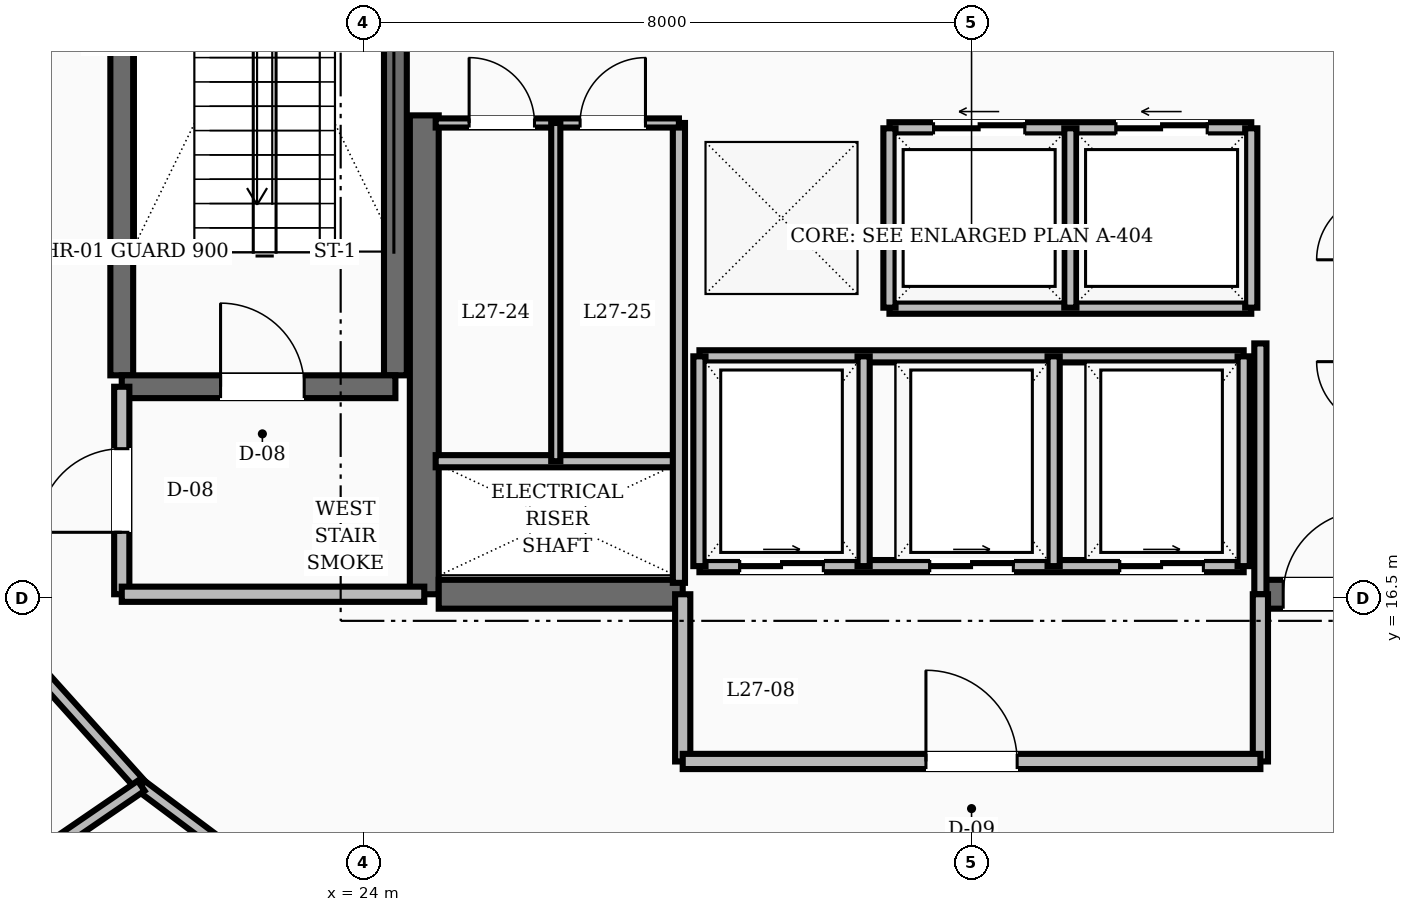
"""IFC4 building model, lengths in metres.
Left out: names, types, materials, properties, quantities, classifications, styles, units other than length and angle.
Written with IfcOpenShell. Run it as: python <this file> out.ifc"""

import sys

from ifc_helpers import new_model, si_unit, direction, frame, frame_2d, origin, place, context, subcontext, project, spatial, rectangle, extrude, element, fill, save


model = new_model("IFC4")
c1 = context("Model", 3, precision=1e-05, world=origin(), true_north=direction((0.0, 1.0)))
c2 = subcontext(c1, "Body", "Model", "MODEL_VIEW")
j1 = project(units=[si_unit("LENGTHUNIT", "METRE"), si_unit("PLANEANGLEUNIT", "RADIAN")], contexts=[c1])
p1 = place(None, origin())
s1 = spatial("IfcSite", under=j1, at=p1, CompositionType="ELEMENT")
p2 = place(p1, origin())
s2 = spatial("IfcBuilding", under=s1, at=p2, CompositionType="ELEMENT")
p3 = place(p2, frame((0.0, 0.0, 106.0)))
s3 = spatial("IfcBuildingStorey", under=s2, at=p3, CompositionType="ELEMENT", Elevation=106.0)
p4 = place(p3, frame((24.8, 16.55, 0.0), z_axis=(0.0, 0.0, 1.0), x_axis=(0.0, 1.0, 0.0)))
e1 = element("IfcWall", 1, at=p4, inside=s3, PredefinedType="SHEAR", context=c2, shape_type="SweptSolid", body=[
    extrude(rectangle(XDim=6.3, YDim=0.38, at=frame_2d((3.15, 0.0))), origin(), (0.0, 0.0, 1.0), 4.8),
])
p5 = place(p3, frame((24.99, 16.55, 0.0), z_axis=(0.0, 0.0, 1.0), x_axis=(1.0, 0.0, 0.0)))
e2 = element("IfcWall", 2, at=p5, inside=s3, PredefinedType="SHEAR", context=c2, shape_type="SweptSolid", body=[
    extrude(rectangle(XDim=3.21, YDim=0.38, at=frame_2d((1.605, 0.0))), origin(), (0.0, 0.0, 1.0), 4.8),
])
p6 = place(p3, frame((35.8, 16.55, 0.0), z_axis=(0.0, 0.0, 1.0), x_axis=(1.0, 0.0, 0.0)))
e3 = element("IfcWall", 3, at=p6, inside=s3, PredefinedType="SHEAR", context=c2, shape_type="SweptSolid", body=[
    extrude(rectangle(XDim=3.21, YDim=0.38, at=frame_2d((1.605, 0.0))), origin(), (0.0, 0.0, 1.0), 4.8),
])
p7 = place(p6, frame((0.3, 0.0, 0.0)))
e4 = element("IfcOpeningElement", 4, at=p7, cuts=e3, PredefinedType="OPENING", context=c2, shape_type="SweptSolid", body=[
    extrude(rectangle(XDim=1.1, YDim=2.1, at=frame_2d((0.55, 1.05))), frame((0.0, 0.2, 0.0), z_axis=(0.0, -1.0, 0.0), x_axis=(1.0, 0.0, 0.0)), (0.0, 0.0, 1.0), 0.4),
])
for number, where, z_axis, x_axis in (
    (5, (20.82, 19.43, 0.0), (0.0, 0.0, 1.0), (0.0, 1.0, 0.0)),
    (6, (24.42, 19.43, 0.0), (0.0, 0.0, 1.0), (0.0, 1.0, 0.0)),
):
    element("IfcWall", number, at=place(p3, frame(where, z_axis=z_axis, x_axis=x_axis)), inside=s3, PredefinedType="SHEAR", context=c2, shape_type="SweptSolid", body=[
        extrude(rectangle(XDim=8.74, YDim=0.3, at=frame_2d((4.37, 0.0))), origin(), (0.0, 0.0, 1.0), 4.8),
    ])
p8 = place(p3, frame((20.82, 19.28, 0.0), z_axis=(0.0, 0.0, 1.0), x_axis=(1.0, 0.0, 0.0)))
e7 = element("IfcWall", 7, at=p8, inside=s3, PredefinedType="SHEAR", context=c2, shape_type="SweptSolid", body=[
    extrude(rectangle(XDim=3.6, YDim=0.3, at=frame_2d((1.8, 0.0))), origin(), (0.0, 0.0, 1.0), 4.8),
])
p9 = place(p8, frame((1.3, 0.0, 0.0)))
e8 = element("IfcOpeningElement", 8, at=p9, cuts=e7, PredefinedType="OPENING", context=c2, shape_type="SweptSolid", body=[
    extrude(rectangle(XDim=1.1, YDim=2.1, at=frame_2d((0.55, 1.05))), frame((0.0, 0.16, 0.0), z_axis=(0.0, -1.0, 0.0), x_axis=(1.0, 0.0, 0.0)), (0.0, 0.0, 1.0), 0.32),
])
p10 = place(p3, frame((20.82, 16.55, 0.0), z_axis=(0.0, 0.0, 1.0), x_axis=(0.0, 1.0, 0.0)))
e9 = element("IfcWall", 9, at=p10, inside=s3, PredefinedType="SOLIDWALL", context=c2, shape_type="SweptSolid", body=[
    extrude(rectangle(XDim=2.73, YDim=0.2, at=frame_2d((1.365, 0.0))), origin(), (0.0, 0.0, 1.0), 3.71),
])
p11 = place(p10, frame((0.815, 0.0, 0.0)))
e10 = element("IfcOpeningElement", 10, at=p11, cuts=e9, PredefinedType="OPENING", context=c2, shape_type="SweptSolid", body=[
    extrude(rectangle(XDim=1.1, YDim=2.1, at=frame_2d((0.55, 1.05))), frame((0.0, 0.11, 0.0), z_axis=(0.0, -1.0, 0.0), x_axis=(1.0, 0.0, 0.0)), (0.0, 0.0, 1.0), 0.22),
])
p12 = place(p3, frame((20.82, 16.55, 0.0), z_axis=(0.0, 0.0, 1.0), x_axis=(1.0, 0.0, 0.0)))
e11 = element("IfcWall", 11, at=p12, inside=s3, PredefinedType="SOLIDWALL", context=c2, shape_type="SweptSolid", body=[
    extrude(rectangle(XDim=3.98, YDim=0.2, at=frame_2d((1.99, 0.0))), origin(), (0.0, 0.0, 1.0), 3.71),
])
p13 = place(p3, frame((35.8, 16.55, 0.0), z_axis=(0.0, 0.0, 1.0), x_axis=(0.0, 1.0, 0.0)))
e12 = element("IfcWall", 12, at=p13, inside=s3, PredefinedType="SOLIDWALL", context=c2, shape_type="SweptSolid", body=[
    extrude(rectangle(XDim=3.3, YDim=0.16, at=frame_2d((1.65, 0.0))), origin(), (0.0, 0.0, 1.0), 3.71),
])
for number, where, z_axis, x_axis in (
    (13, (28.2, 14.35, 0.0), (0.0, 0.0, 1.0), (0.0, 1.0, 0.0)),
    (14, (35.8, 14.35, 0.0), (0.0, 0.0, 1.0), (0.0, 1.0, 0.0)),
):
    element("IfcWall", number, at=place(p3, frame(where, z_axis=z_axis, x_axis=x_axis)), inside=s3, PredefinedType="SOLIDWALL", context=c2, shape_type="SweptSolid", body=[
        extrude(rectangle(XDim=2.2, YDim=0.2, at=frame_2d((1.1, 0.0))), origin(), (0.0, 0.0, 1.0), 3.71),
    ])
p14 = place(p3, frame((28.2, 14.35, 0.0), z_axis=(0.0, 0.0, 1.0), x_axis=(1.0, 0.0, 0.0)))
e15 = element("IfcWall", 15, at=p14, inside=s3, PredefinedType="SOLIDWALL", context=c2, shape_type="SweptSolid", body=[
    extrude(rectangle(XDim=7.6, YDim=0.2, at=frame_2d((3.8, 0.0))), origin(), (0.0, 0.0, 1.0), 3.71),
])
p15 = place(p14, frame((3.2, 0.0, 0.0)))
e16 = element("IfcOpeningElement", 16, at=p15, cuts=e15, PredefinedType="OPENING", context=c2, shape_type="SweptSolid", body=[
    extrude(rectangle(XDim=1.2, YDim=2.1, at=frame_2d((0.6, 1.05))), frame((0.0, 0.11, 0.0), z_axis=(0.0, -1.0, 0.0), x_axis=(1.0, 0.0, 0.0)), (0.0, 0.0, 1.0), 0.22),
])
p16 = place(p3, frame((30.92, 22.68, 0.0), z_axis=(0.0, 0.0, 1.0), x_axis=(1.0, 0.0, 0.0)))
e17 = element("IfcWall", 17, at=p16, inside=s3, PredefinedType="SOLIDWALL", context=c2, shape_type="SweptSolid", body=[
    extrude(rectangle(XDim=4.76, YDim=0.16, at=frame_2d((2.38, 0.0))), origin(), (0.0, 0.0, 1.0), 3.71),
])
p17 = place(p16, frame((0.58, 0.0, 0.0)))
e18 = element("IfcOpeningElement", 18, at=p17, cuts=e17, PredefinedType="OPENING", context=c2, shape_type="SweptSolid", body=[
    extrude(rectangle(XDim=1.2, YDim=2.15, at=frame_2d((0.6, 1.075))), frame((0.0, 0.09, 0.0), z_axis=(0.0, -1.0, 0.0), x_axis=(1.0, 0.0, 0.0)), (0.0, 0.0, 1.0), 0.18),
])
p18 = place(p16, frame((2.98, 0.0, 0.0)))
e19 = element("IfcOpeningElement", 19, at=p18, cuts=e17, PredefinedType="OPENING", context=c2, shape_type="SweptSolid", body=[
    extrude(rectangle(XDim=1.2, YDim=2.15, at=frame_2d((0.6, 1.075))), frame((0.0, 0.09, 0.0), z_axis=(0.0, -1.0, 0.0), x_axis=(1.0, 0.0, 0.0)), (0.0, 0.0, 1.0), 0.18),
])
p19 = place(p3, frame((30.92, 20.32, 0.0), z_axis=(0.0, 0.0, 1.0), x_axis=(1.0, 0.0, 0.0)))
e20 = element("IfcWall", 20, at=p19, inside=s3, PredefinedType="SOLIDWALL", context=c2, shape_type="SweptSolid", body=[
    extrude(rectangle(XDim=4.76, YDim=0.16, at=frame_2d((2.38, 0.0))), origin(), (0.0, 0.0, 1.0), 3.71),
])
for number, where, z_axis, x_axis in (
    (21, (30.92, 20.32, 0.0), (0.0, 0.0, 1.0), (0.0, 1.0, 0.0)),
    (22, (33.3, 20.32, 0.0), (0.0, 0.0, 1.0), (0.0, 1.0, 0.0)),
    (23, (35.68, 20.32, 0.0), (0.0, 0.0, 1.0), (0.0, 1.0, 0.0)),
):
    element("IfcWall", number, at=place(p3, frame(where, z_axis=z_axis, x_axis=x_axis)), inside=s3, PredefinedType="SOLIDWALL", context=c2, shape_type="SweptSolid", body=[
        extrude(rectangle(XDim=2.36, YDim=0.16, at=frame_2d((1.18, 0.0))), origin(), (0.0, 0.0, 1.0), 3.71),
    ])
p20 = place(p3, frame((28.42, 16.92, 0.0), z_axis=(0.0, 0.0, 1.0), x_axis=(1.0, 0.0, 0.0)))
e24 = element("IfcWall", 24, at=p20, inside=s3, PredefinedType="SOLIDWALL", context=c2, shape_type="SweptSolid", body=[
    extrude(rectangle(XDim=7.16, YDim=0.16, at=frame_2d((3.58, 0.0))), origin(), (0.0, 0.0, 1.0), 3.71),
])
p21 = place(p20, frame((0.53, 0.0, 0.0)))
e25 = element("IfcOpeningElement", 25, at=p21, cuts=e24, PredefinedType="OPENING", context=c2, shape_type="SweptSolid", body=[
    extrude(rectangle(XDim=1.1, YDim=2.15, at=frame_2d((0.55, 1.075))), frame((0.0, 0.09, 0.0), z_axis=(0.0, -1.0, 0.0), x_axis=(1.0, 0.0, 0.0)), (0.0, 0.0, 1.0), 0.18),
])
p22 = place(p20, frame((3.03, 0.0, 0.0)))
e26 = element("IfcOpeningElement", 26, at=p22, cuts=e24, PredefinedType="OPENING", context=c2, shape_type="SweptSolid", body=[
    extrude(rectangle(XDim=1.1, YDim=2.15, at=frame_2d((0.55, 1.075))), frame((0.0, 0.09, 0.0), z_axis=(0.0, -1.0, 0.0), x_axis=(1.0, 0.0, 0.0)), (0.0, 0.0, 1.0), 0.18),
])
p23 = place(p20, frame((5.53, 0.0, 0.0)))
e27 = element("IfcOpeningElement", 27, at=p23, cuts=e24, PredefinedType="OPENING", context=c2, shape_type="SweptSolid", body=[
    extrude(rectangle(XDim=1.1, YDim=2.15, at=frame_2d((0.55, 1.075))), frame((0.0, 0.09, 0.0), z_axis=(0.0, -1.0, 0.0), x_axis=(1.0, 0.0, 0.0)), (0.0, 0.0, 1.0), 0.18),
])
p24 = place(p3, frame((28.42, 19.68, 0.0), z_axis=(0.0, 0.0, 1.0), x_axis=(1.0, 0.0, 0.0)))
e28 = element("IfcWall", 28, at=p24, inside=s3, PredefinedType="SOLIDWALL", context=c2, shape_type="SweptSolid", body=[
    extrude(rectangle(XDim=7.16, YDim=0.16, at=frame_2d((3.58, 0.0))), origin(), (0.0, 0.0, 1.0), 3.71),
])
for number, where, z_axis, x_axis in (
    (29, (28.42, 16.92, 0.0), (0.0, 0.0, 1.0), (0.0, 1.0, 0.0)),
    (30, (30.58, 16.92, 0.0), (0.0, 0.0, 1.0), (0.0, 1.0, 0.0)),
    (31, (33.08, 16.92, 0.0), (0.0, 0.0, 1.0), (0.0, 1.0, 0.0)),
    (32, (35.58, 16.92, 0.0), (0.0, 0.0, 1.0), (0.0, 1.0, 0.0)),
):
    element("IfcWall", number, at=place(p3, frame(where, z_axis=z_axis, x_axis=x_axis)), inside=s3, PredefinedType="SOLIDWALL", context=c2, shape_type="SweptSolid", body=[
        extrude(rectangle(XDim=2.76, YDim=0.16, at=frame_2d((1.38, 0.0))), origin(), (0.0, 0.0, 1.0), 3.71),
    ])
p25 = place(p3, frame((24.95, 18.3, 0.0), z_axis=(0.0, 0.0, 1.0), x_axis=(1.0, 0.0, 0.0)))
e33 = element("IfcWall", 33, at=p25, inside=s3, PredefinedType="SOLIDWALL", context=c2, shape_type="SweptSolid", body=[
    extrude(rectangle(XDim=3.2, YDim=0.16, at=frame_2d((1.6, 0.0))), origin(), (0.0, 0.0, 1.0), 3.71),
])
p26 = place(p3, frame((28.15, 16.7, 0.0), z_axis=(0.0, 0.0, 1.0), x_axis=(0.0, 1.0, 0.0)))
e34 = element("IfcWall", 34, at=p26, inside=s3, PredefinedType="SOLIDWALL", context=c2, shape_type="SweptSolid", body=[
    extrude(rectangle(XDim=6.05, YDim=0.16, at=frame_2d((3.025, 0.0))), origin(), (0.0, 0.0, 1.0), 3.71),
])
p27 = place(p3, frame((24.95, 22.75, 0.0), z_axis=(0.0, 0.0, 1.0), x_axis=(1.0, 0.0, 0.0)))
e35 = element("IfcWall", 35, at=p27, inside=s3, PredefinedType="PARTITIONING", context=c2, shape_type="SweptSolid", body=[
    extrude(rectangle(XDim=3.2, YDim=0.12, at=frame_2d((1.6, 0.0))), origin(), (0.0, 0.0, 1.0), 3.71),
])
p28 = place(p27, frame((0.44, 0.0, 0.0)))
e36 = element("IfcOpeningElement", 36, at=p28, cuts=e35, PredefinedType="OPENING", context=c2, shape_type="SweptSolid", body=[
    extrude(rectangle(XDim=0.86, YDim=2.1, at=frame_2d((0.43, 1.05))), frame((0.0, 0.07, 0.0), z_axis=(0.0, -1.0, 0.0), x_axis=(1.0, 0.0, 0.0)), (0.0, 0.0, 1.0), 0.14),
])
p29 = place(p27, frame((1.9, 0.0, 0.0)))
e37 = element("IfcOpeningElement", 37, at=p29, cuts=e35, PredefinedType="OPENING", context=c2, shape_type="SweptSolid", body=[
    extrude(rectangle(XDim=0.86, YDim=2.1, at=frame_2d((0.43, 1.05))), frame((0.0, 0.07, 0.0), z_axis=(0.0, -1.0, 0.0), x_axis=(1.0, 0.0, 0.0)), (0.0, 0.0, 1.0), 0.14),
])
p30 = place(p3, frame((26.53, 18.3, 0.0), z_axis=(0.0, 0.0, 1.0), x_axis=(0.0, 1.0, 0.0)))
e38 = element("IfcWall", 38, at=p30, inside=s3, PredefinedType="PARTITIONING", context=c2, shape_type="SweptSolid", body=[
    extrude(rectangle(XDim=4.45, YDim=0.12, at=frame_2d((2.225, 0.0))), origin(), (0.0, 0.0, 1.0), 3.71),
])
p31 = place(p3, frame((19.154, 16.167, 0.0), z_axis=(0.0, 0.0, 1.0), x_axis=(0.668645478294, -0.743581350194, 0.0)))
e39 = element("IfcWall", 39, at=p31, inside=s3, PredefinedType="SOLIDWALL", context=c2, shape_type="SweptSolid", body=[
    extrude(rectangle(XDim=2.874, YDim=0.16, at=frame_2d((1.437, 0.0))), origin(), (0.0, 0.0, 1.0), 3.71),
])
p32 = place(p3, frame((21.075, 14.03, 0.0), z_axis=(0.0, 0.0, 1.0), x_axis=(0.800420462314, -0.599438973966, 0.0)))
e40 = element("IfcWall", 40, at=p32, inside=s3, PredefinedType="SOLIDWALL", context=c2, shape_type="SweptSolid", body=[
    extrude(rectangle(XDim=2.925, YDim=0.16, at=frame_2d((1.462, 0.0))), origin(), (0.0, 0.0, 1.0), 3.71),
])
p33 = place(p3, frame((21.075, 14.03, 0.0), z_axis=(0.0, 0.0, 1.0), x_axis=(-0.825084174335, -0.56500982758, 0.0)))
e41 = element("IfcWall", 41, at=p33, inside=s3, PredefinedType="SOLIDWALL", context=c2, shape_type="SweptSolid", body=[
    extrude(rectangle(XDim=9.747, YDim=0.16, at=frame_2d((4.874, 0.0))), origin(), (0.0, 0.0, 1.0), 3.71),
])
p34 = place(p9, origin())
e42 = element("IfcDoor", 42, at=p34, inside=s3, OperationType="SINGLE_SWING_LEFT", PredefinedType="DOOR", context=c2, shape_type="SweptSolid", body=[
    extrude(rectangle(XDim=1.1, YDim=2.1, at=frame_2d((0.55, 1.05))), frame((0.0, 0.025, 0.0), z_axis=(0.0, -1.0, 0.0), x_axis=(1.0, 0.0, 0.0)), (0.0, 0.0, 1.0), 0.05),
])
fill(e8, e42)
p35 = place(p11, origin())
e43 = element("IfcDoor", 43, at=p35, inside=s3, OperationType="SINGLE_SWING_LEFT", PredefinedType="DOOR", context=c2, shape_type="SweptSolid", body=[
    extrude(rectangle(XDim=1.1, YDim=2.1, at=frame_2d((0.55, 1.05))), frame((0.0, 0.025, 0.0), z_axis=(0.0, -1.0, 0.0), x_axis=(1.0, 0.0, 0.0)), (0.0, 0.0, 1.0), 0.05),
])
fill(e10, e43)
p36 = place(p7, origin())
e44 = element("IfcDoor", 44, at=p36, inside=s3, OperationType="SINGLE_SWING_RIGHT", PredefinedType="DOOR", context=c2, shape_type="SweptSolid", body=[
    extrude(rectangle(XDim=1.1, YDim=2.1, at=frame_2d((0.55, 1.05))), frame((0.0, 0.025, 0.0), z_axis=(0.0, -1.0, 0.0), x_axis=(1.0, 0.0, 0.0)), (0.0, 0.0, 1.0), 0.05),
])
fill(e4, e44)
p37 = place(p15, origin())
e45 = element("IfcDoor", 45, at=p37, inside=s3, OperationType="SINGLE_SWING_LEFT", PredefinedType="DOOR", context=c2, shape_type="SweptSolid", body=[
    extrude(rectangle(XDim=1.2, YDim=2.1, at=frame_2d((0.6, 1.05))), frame((0.0, 0.025, 0.0), z_axis=(0.0, -1.0, 0.0), x_axis=(1.0, 0.0, 0.0)), (0.0, 0.0, 1.0), 0.05),
])
fill(e16, e45)
p38 = place(p17, origin())
e46 = element("IfcDoor", 46, at=p38, inside=s3, OperationType="SLIDING_TO_LEFT", PredefinedType="DOOR", context=c2, shape_type="SweptSolid", body=[
    extrude(rectangle(XDim=1.2, YDim=2.15, at=frame_2d((0.6, 1.075))), frame((0.0, 0.025, 0.0), z_axis=(0.0, -1.0, 0.0), x_axis=(1.0, 0.0, 0.0)), (0.0, 0.0, 1.0), 0.05),
])
fill(e18, e46)
p39 = place(p18, origin())
e47 = element("IfcDoor", 47, at=p39, inside=s3, OperationType="SLIDING_TO_LEFT", PredefinedType="DOOR", context=c2, shape_type="SweptSolid", body=[
    extrude(rectangle(XDim=1.2, YDim=2.15, at=frame_2d((0.6, 1.075))), frame((0.0, 0.025, 0.0), z_axis=(0.0, -1.0, 0.0), x_axis=(1.0, 0.0, 0.0)), (0.0, 0.0, 1.0), 0.05),
])
fill(e19, e47)
p40 = place(p21, origin())
e48 = element("IfcDoor", 48, at=p40, inside=s3, OperationType="SLIDING_TO_RIGHT", PredefinedType="DOOR", context=c2, shape_type="SweptSolid", body=[
    extrude(rectangle(XDim=1.1, YDim=2.15, at=frame_2d((0.55, 1.075))), frame((0.0, 0.025, 0.0), z_axis=(0.0, -1.0, 0.0), x_axis=(1.0, 0.0, 0.0)), (0.0, 0.0, 1.0), 0.05),
])
fill(e25, e48)
p41 = place(p22, origin())
e49 = element("IfcDoor", 49, at=p41, inside=s3, OperationType="SLIDING_TO_RIGHT", PredefinedType="DOOR", context=c2, shape_type="SweptSolid", body=[
    extrude(rectangle(XDim=1.1, YDim=2.15, at=frame_2d((0.55, 1.075))), frame((0.0, 0.025, 0.0), z_axis=(0.0, -1.0, 0.0), x_axis=(1.0, 0.0, 0.0)), (0.0, 0.0, 1.0), 0.05),
])
fill(e26, e49)
p42 = place(p23, origin())
e50 = element("IfcDoor", 50, at=p42, inside=s3, OperationType="SLIDING_TO_RIGHT", PredefinedType="DOOR", context=c2, shape_type="SweptSolid", body=[
    extrude(rectangle(XDim=1.1, YDim=2.15, at=frame_2d((0.55, 1.075))), frame((0.0, 0.025, 0.0), z_axis=(0.0, -1.0, 0.0), x_axis=(1.0, 0.0, 0.0)), (0.0, 0.0, 1.0), 0.05),
])
fill(e27, e50)
p43 = place(p28, origin())
e51 = element("IfcDoor", 51, at=p43, inside=s3, OperationType="SINGLE_SWING_LEFT", PredefinedType="DOOR", context=c2, shape_type="SweptSolid", body=[
    extrude(rectangle(XDim=0.86, YDim=2.1, at=frame_2d((0.43, 1.05))), frame((0.0, 0.025, 0.0), z_axis=(0.0, -1.0, 0.0), x_axis=(1.0, 0.0, 0.0)), (0.0, 0.0, 1.0), 0.05),
])
fill(e36, e51)
p44 = place(p29, origin())
e52 = element("IfcDoor", 52, at=p44, inside=s3, OperationType="SINGLE_SWING_RIGHT", PredefinedType="DOOR", context=c2, shape_type="SweptSolid", body=[
    extrude(rectangle(XDim=0.86, YDim=2.1, at=frame_2d((0.43, 1.05))), frame((0.0, 0.025, 0.0), z_axis=(0.0, -1.0, 0.0), x_axis=(1.0, 0.0, 0.0)), (0.0, 0.0, 1.0), 0.05),
])
fill(e37, e52)
save(model, sys.argv[1])
